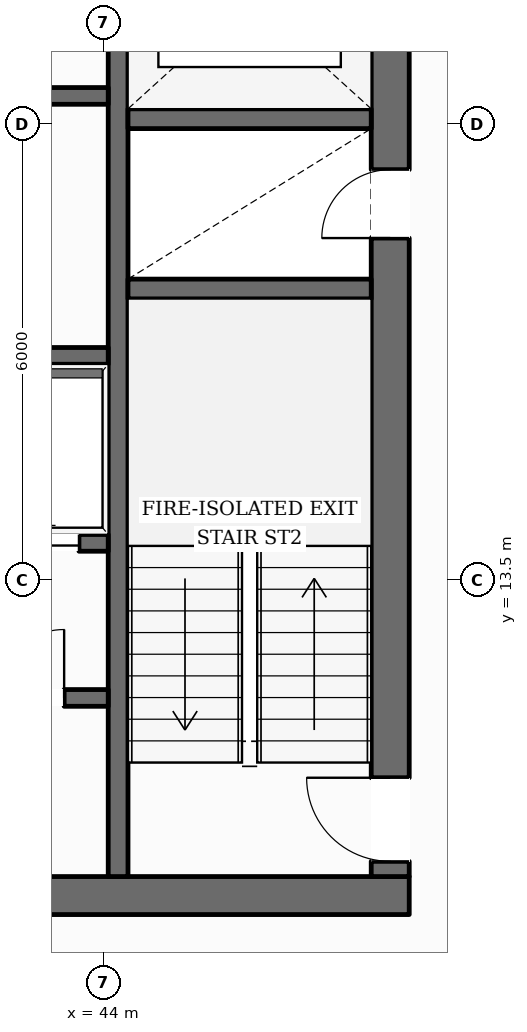
"""IFC4 building model, lengths in metres.
Left out: names, types, materials, properties, quantities, classifications, styles, units other than length and angle.
Written with IfcOpenShell. Run it as: python <this file> out.ifc"""

import sys

from ifc_helpers import new_model, si_unit, direction, frame, frame_2d, origin, place, context, subcontext, project, spatial, rectangle, extrude, element, fill, save


model = new_model("IFC4")
c1 = context("Model", 3, precision=1e-05, world=origin(), true_north=direction((0.0, 1.0)))
c2 = subcontext(c1, "Body", "Model", "MODEL_VIEW")
j1 = project(units=[si_unit("LENGTHUNIT", "METRE"), si_unit("PLANEANGLEUNIT", "RADIAN")], contexts=[c1])
p1 = place(None, origin())
s1 = spatial("IfcSite", under=j1, at=p1, CompositionType="ELEMENT")
p2 = place(p1, origin())
s2 = spatial("IfcBuilding", under=s1, at=p2, CompositionType="ELEMENT")
p3 = place(p2, frame((0.0, 0.0, 112.45)))
s3 = spatial("IfcBuildingStorey", under=s2, at=p3, CompositionType="ELEMENT", Elevation=112.45)
p4 = place(p3, frame((27.98, 9.35, 0.0), z_axis=(0.0, 0.0, 1.0), x_axis=(1.0, 0.0, 0.0)))
e1 = element("IfcWall", 1, at=p4, inside=s3, PredefinedType="SOLIDWALL", context=c2, shape_type="SweptSolid", body=[
    extrude(rectangle(XDim=20.04, YDim=0.5, at=frame_2d((10.02, 0.0))), origin(), (0.0, 0.0, 1.0), 3.6),
])
p5 = place(p4, frame((10.52, 0.0, 0.0)))
e2 = element("IfcOpeningElement", 2, at=p5, cuts=e1, PredefinedType="OPENING", context=c2, shape_type="SweptSolid", body=[
    extrude(rectangle(XDim=1.4, YDim=2.2, at=frame_2d((0.7, 1.1))), frame((0.0, 0.26, 0.0), z_axis=(0.0, -1.0, 0.0), x_axis=(1.0, 0.0, 0.0)), (0.0, 0.0, 1.0), 0.52),
])
p6 = place(p3, frame((47.77, 9.6, 0.0), z_axis=(0.0, 0.0, 1.0), x_axis=(0.0, 1.0, 0.0)))
e3 = element("IfcWall", 3, at=p6, inside=s3, PredefinedType="SOLIDWALL", context=c2, shape_type="SweptSolid", body=[
    extrude(rectangle(XDim=13.0, YDim=0.5, at=frame_2d((6.5, 0.0))), origin(), (0.0, 0.0, 1.0), 3.6),
])
p7 = place(p6, frame((0.2, 0.0, 0.0)))
e4 = element("IfcOpeningElement", 4, at=p7, cuts=e3, PredefinedType="OPENING", context=c2, shape_type="SweptSolid", body=[
    extrude(rectangle(XDim=1.1, YDim=2.15, at=frame_2d((0.55, 1.075))), frame((0.0, 0.26, 0.0), z_axis=(0.0, -1.0, 0.0), x_axis=(1.0, 0.0, 0.0)), (0.0, 0.0, 1.0), 0.52),
])
p8 = place(p6, frame((8.4, 0.0, 0.0)))
e5 = element("IfcOpeningElement", 5, at=p8, cuts=e3, PredefinedType="OPENING", context=c2, shape_type="SweptSolid", body=[
    extrude(rectangle(XDim=0.9, YDim=2.1, at=frame_2d((0.45, 1.05))), frame((0.0, 0.26, 0.0), z_axis=(0.0, -1.0, 0.0), x_axis=(1.0, 0.0, 0.0)), (0.0, 0.0, 1.0), 0.52),
])
p9 = place(p3, frame((44.19, 9.6, 0.0), z_axis=(0.0, 0.0, 1.0), x_axis=(0.0, 1.0, 0.0)))
e6 = element("IfcWall", 6, at=p9, inside=s3, PredefinedType="SHEAR", context=c2, shape_type="SweptSolid", body=[
    extrude(rectangle(XDim=13.0, YDim=0.26, at=frame_2d((6.5, 0.0))), origin(), (0.0, 0.0, 1.0), 3.6),
])
p10 = place(p9, frame((10.925, 0.0, 0.0)))
e7 = element("IfcOpeningElement", 7, at=p10, cuts=e6, PredefinedType="OPENING", context=c2, shape_type="SweptSolid", body=[
    extrude(rectangle(XDim=1.25, YDim=2.25, at=frame_2d((0.625, 1.125))), frame((0.0, 0.14, 0.0), z_axis=(0.0, -1.0, 0.0), x_axis=(1.0, 0.0, 0.0)), (0.0, 0.0, 1.0), 0.28),
])
for number, where, z_axis, x_axis in (
    (8, (44.32, 17.33, 0.0), (0.0, 0.0, 1.0), (1.0, 0.0, 0.0)),
    (9, (44.32, 19.57, 0.0), (0.0, 0.0, 1.0), (1.0, 0.0, 0.0)),
):
    element("IfcWall", number, at=place(p3, frame(where, z_axis=z_axis, x_axis=x_axis)), inside=s3, PredefinedType="SHEAR", context=c2, shape_type="SweptSolid", body=[
        extrude(rectangle(XDim=3.2, YDim=0.26, at=frame_2d((1.6, 0.0))), origin(), (0.0, 0.0, 1.0), 3.6),
    ])
p11 = place(p3, frame((31.94, 19.87, 0.0), z_axis=(0.0, 0.0, 1.0), x_axis=(1.0, 0.0, 0.0)))
e10 = element("IfcWall", 10, at=p11, inside=s3, PredefinedType="SOLIDWALL", context=c2, shape_type="SweptSolid", body=[
    extrude(rectangle(XDim=12.12, YDim=0.22, at=frame_2d((6.06, 0.0))), origin(), (0.0, 0.0, 1.0), 3.6),
])
p12 = place(p11, frame((6.3, 0.0, 0.0)))
e11 = element("IfcOpeningElement", 11, at=p12, cuts=e10, PredefinedType="OPENING", context=c2, shape_type="SweptSolid", body=[
    extrude(rectangle(XDim=1.1, YDim=2.15, at=frame_2d((0.55, 1.075))), frame((0.0, 0.12, 0.0), z_axis=(0.0, -1.0, 0.0), x_axis=(1.0, 0.0, 0.0)), (0.0, 0.0, 1.0), 0.24),
])
p13 = place(p11, frame((8.01, 0.0, 0.0)))
e12 = element("IfcOpeningElement", 12, at=p13, cuts=e10, PredefinedType="OPENING", context=c2, shape_type="SweptSolid", body=[
    extrude(rectangle(XDim=0.9, YDim=2.1, at=frame_2d((0.45, 1.05))), frame((0.0, 0.12, 0.0), z_axis=(0.0, -1.0, 0.0), x_axis=(1.0, 0.0, 0.0)), (0.0, 0.0, 1.0), 0.24),
])
p14 = place(p11, frame((10.21, 0.0, 0.0)))
e13 = element("IfcOpeningElement", 13, at=p14, cuts=e10, PredefinedType="OPENING", context=c2, shape_type="SweptSolid", body=[
    extrude(rectangle(XDim=0.9, YDim=2.1, at=frame_2d((0.45, 1.05))), frame((0.0, 0.12, 0.0), z_axis=(0.0, -1.0, 0.0), x_axis=(1.0, 0.0, 0.0)), (0.0, 0.0, 1.0), 0.24),
])
p15 = place(p3, frame((31.94, 16.45, 0.0), z_axis=(0.0, 0.0, 1.0), x_axis=(1.0, 0.0, 0.0)))
e14 = element("IfcWall", 14, at=p15, inside=s3, PredefinedType="SOLIDWALL", context=c2, shape_type="SweptSolid", body=[
    extrude(rectangle(XDim=12.12, YDim=0.22, at=frame_2d((6.06, 0.0))), origin(), (0.0, 0.0, 1.0), 3.6),
])
p16 = place(p3, frame((31.94, 13.99, 0.0), z_axis=(0.0, 0.0, 1.0), x_axis=(1.0, 0.0, 0.0)))
e15 = element("IfcWall", 15, at=p16, inside=s3, PredefinedType="SOLIDWALL", context=c2, shape_type="SweptSolid", body=[
    extrude(rectangle(XDim=12.12, YDim=0.22, at=frame_2d((6.06, 0.0))), origin(), (0.0, 0.0, 1.0), 3.6),
])
p17 = place(p16, frame((2.51, 0.0, 0.0)))
e16 = element("IfcOpeningElement", 16, at=p17, cuts=e15, PredefinedType="OPENING", context=c2, shape_type="SweptSolid", body=[
    extrude(rectangle(XDim=0.9, YDim=2.1, at=frame_2d((0.45, 1.05))), frame((0.0, 0.12, 0.0), z_axis=(0.0, -1.0, 0.0), x_axis=(1.0, 0.0, 0.0)), (0.0, 0.0, 1.0), 0.24),
])
p18 = place(p16, frame((6.535, 0.0, 0.0)))
e17 = element("IfcOpeningElement", 17, at=p18, cuts=e15, PredefinedType="OPENING", context=c2, shape_type="SweptSolid", body=[
    extrude(rectangle(XDim=1.1, YDim=2.2, at=frame_2d((0.55, 1.1))), frame((0.0, 0.12, 0.0), z_axis=(0.0, -1.0, 0.0), x_axis=(1.0, 0.0, 0.0)), (0.0, 0.0, 1.0), 0.24),
])
p19 = place(p16, frame((8.585, 0.0, 0.0)))
e18 = element("IfcOpeningElement", 18, at=p19, cuts=e15, PredefinedType="OPENING", context=c2, shape_type="SweptSolid", body=[
    extrude(rectangle(XDim=1.1, YDim=2.2, at=frame_2d((0.55, 1.1))), frame((0.0, 0.12, 0.0), z_axis=(0.0, -1.0, 0.0), x_axis=(1.0, 0.0, 0.0)), (0.0, 0.0, 1.0), 0.24),
])
p20 = place(p16, frame((10.635, 0.0, 0.0)))
e19 = element("IfcOpeningElement", 19, at=p20, cuts=e15, PredefinedType="OPENING", context=c2, shape_type="SweptSolid", body=[
    extrude(rectangle(XDim=1.1, YDim=2.2, at=frame_2d((0.55, 1.1))), frame((0.0, 0.12, 0.0), z_axis=(0.0, -1.0, 0.0), x_axis=(1.0, 0.0, 0.0)), (0.0, 0.0, 1.0), 0.24),
])
p21 = place(p3, frame((40.28, 11.95, 0.0), z_axis=(0.0, 0.0, 1.0), x_axis=(1.0, 0.0, 0.0)))
e20 = element("IfcWall", 20, at=p21, inside=s3, PredefinedType="SOLIDWALL", context=c2, shape_type="SweptSolid", body=[
    extrude(rectangle(XDim=3.78, YDim=0.22, at=frame_2d((1.89, 0.0))), origin(), (0.0, 0.0, 1.0), 3.6),
])
p22 = place(p21, frame((0.47, 0.0, 0.0)))
e21 = element("IfcOpeningElement", 21, at=p22, cuts=e20, PredefinedType="OPENING", context=c2, shape_type="SweptSolid", body=[
    extrude(rectangle(XDim=0.9, YDim=2.1, at=frame_2d((0.45, 1.05))), frame((0.0, 0.12, 0.0), z_axis=(0.0, -1.0, 0.0), x_axis=(1.0, 0.0, 0.0)), (0.0, 0.0, 1.0), 0.24),
])
p23 = place(p21, frame((2.3, 0.0, 0.0)))
e22 = element("IfcOpeningElement", 22, at=p23, cuts=e20, PredefinedType="OPENING", context=c2, shape_type="SweptSolid", body=[
    extrude(rectangle(XDim=0.9, YDim=2.1, at=frame_2d((0.45, 1.05))), frame((0.0, 0.12, 0.0), z_axis=(0.0, -1.0, 0.0), x_axis=(1.0, 0.0, 0.0)), (0.0, 0.0, 1.0), 0.24),
])
p24 = place(p3, frame((44.076, 44.609, 0.0), z_axis=(0.0, 0.0, 1.0), x_axis=(0.500826973377, -0.865547423737, 0.0)))
e23 = element("IfcWall", 23, at=p24, inside=s3, PredefinedType="STANDARD", context=c2, shape_type="SweptSolid", body=[
    extrude(rectangle(XDim=36.65, YDim=0.38, at=frame_2d((18.325, 0.0))), origin(), (0.0, 0.0, 1.0), 3.059),
])
p25 = place(p24, frame((26.887, 0.0, 0.0)))
e24 = element("IfcOpeningElement", 24, at=p25, cuts=e23, PredefinedType="OPENING", context=c2, shape_type="SweptSolid", body=[
    extrude(rectangle(XDim=1.0, YDim=2.2, at=frame_2d((0.5, 1.1))), frame((0.0, 0.2, 0.0), z_axis=(0.0, -1.0, 0.0), x_axis=(1.0, 0.0, 0.0)), (0.0, 0.0, 1.0), 0.4),
])
p26 = place(p24, frame((32.424, 0.0, 0.65)))
e25 = element("IfcOpeningElement", 25, at=p26, cuts=e23, PredefinedType="OPENING", context=c2, shape_type="SweptSolid", body=[
    extrude(rectangle(XDim=1.55, YDim=1.75, at=frame_2d((0.775, 0.875))), frame((0.0, 0.2, 0.0), z_axis=(0.0, -1.0, 0.0), x_axis=(1.0, 0.0, 0.0)), (0.0, 0.0, 1.0), 0.4),
])
p27 = place(p24, frame((20.524, 0.0, 0.65)))
e26 = element("IfcOpeningElement", 26, at=p27, cuts=e23, PredefinedType="OPENING", context=c2, shape_type="SweptSolid", body=[
    extrude(rectangle(XDim=1.55, YDim=1.75, at=frame_2d((0.775, 0.875))), frame((0.0, 0.2, 0.0), z_axis=(0.0, -1.0, 0.0), x_axis=(1.0, 0.0, 0.0)), (0.0, 0.0, 1.0), 0.4),
])
p28 = place(p24, frame((8.625, 0.0, 0.65)))
e27 = element("IfcOpeningElement", 27, at=p28, cuts=e23, PredefinedType="OPENING", context=c2, shape_type="SweptSolid", body=[
    extrude(rectangle(XDim=1.55, YDim=1.75, at=frame_2d((0.775, 0.875))), frame((0.0, 0.2, 0.0), z_axis=(0.0, -1.0, 0.0), x_axis=(1.0, 0.0, 0.0)), (0.0, 0.0, 1.0), 0.4),
])
p29 = place(p24, frame((2.675, 0.0, 0.65)))
e28 = element("IfcOpeningElement", 28, at=p29, cuts=e23, PredefinedType="OPENING", context=c2, shape_type="SweptSolid", body=[
    extrude(rectangle(XDim=1.55, YDim=1.75, at=frame_2d((0.775, 0.875))), frame((0.0, 0.2, 0.0), z_axis=(0.0, -1.0, 0.0), x_axis=(1.0, 0.0, 0.0)), (0.0, 0.0, 1.0), 0.4),
])
p30 = place(p7, origin())
e29 = element("IfcDoor", 29, at=p30, inside=s3, OperationType="SINGLE_SWING_RIGHT", PredefinedType="DOOR", context=c2, shape_type="SweptSolid", body=[
    extrude(rectangle(XDim=1.1, YDim=2.15, at=frame_2d((0.55, 1.075))), frame((0.0, 0.025, 0.0), z_axis=(0.0, -1.0, 0.0), x_axis=(1.0, 0.0, 0.0)), (0.0, 0.0, 1.0), 0.05),
])
fill(e4, e29)
p31 = place(p8, origin())
e30 = element("IfcDoor", 30, at=p31, inside=s3, OperationType="SINGLE_SWING_LEFT", PredefinedType="DOOR", context=c2, shape_type="SweptSolid", body=[
    extrude(rectangle(XDim=0.9, YDim=2.1, at=frame_2d((0.45, 1.05))), frame((0.0, 0.025, 0.0), z_axis=(0.0, -1.0, 0.0), x_axis=(1.0, 0.0, 0.0)), (0.0, 0.0, 1.0), 0.05),
])
fill(e5, e30)
p32 = place(p20, origin())
e31 = element("IfcDoor", 31, at=p32, inside=s3, OperationType="DOUBLE_DOOR_SLIDING", PredefinedType="DOOR", context=c2, shape_type="SweptSolid", body=[
    extrude(rectangle(XDim=1.1, YDim=2.2, at=frame_2d((0.55, 1.1))), frame((0.0, 0.025, 0.0), z_axis=(0.0, -1.0, 0.0), x_axis=(1.0, 0.0, 0.0)), (0.0, 0.0, 1.0), 0.05),
])
fill(e19, e31)
p33 = place(p23, origin())
e32 = element("IfcDoor", 32, at=p33, inside=s3, OperationType="SINGLE_SWING_RIGHT", PredefinedType="DOOR", context=c2, shape_type="SweptSolid", body=[
    extrude(rectangle(XDim=0.9, YDim=2.1, at=frame_2d((0.45, 1.05))), frame((0.0, 0.025, 0.0), z_axis=(0.0, -1.0, 0.0), x_axis=(1.0, 0.0, 0.0)), (0.0, 0.0, 1.0), 0.05),
])
fill(e22, e32)
save(model, sys.argv[1])
